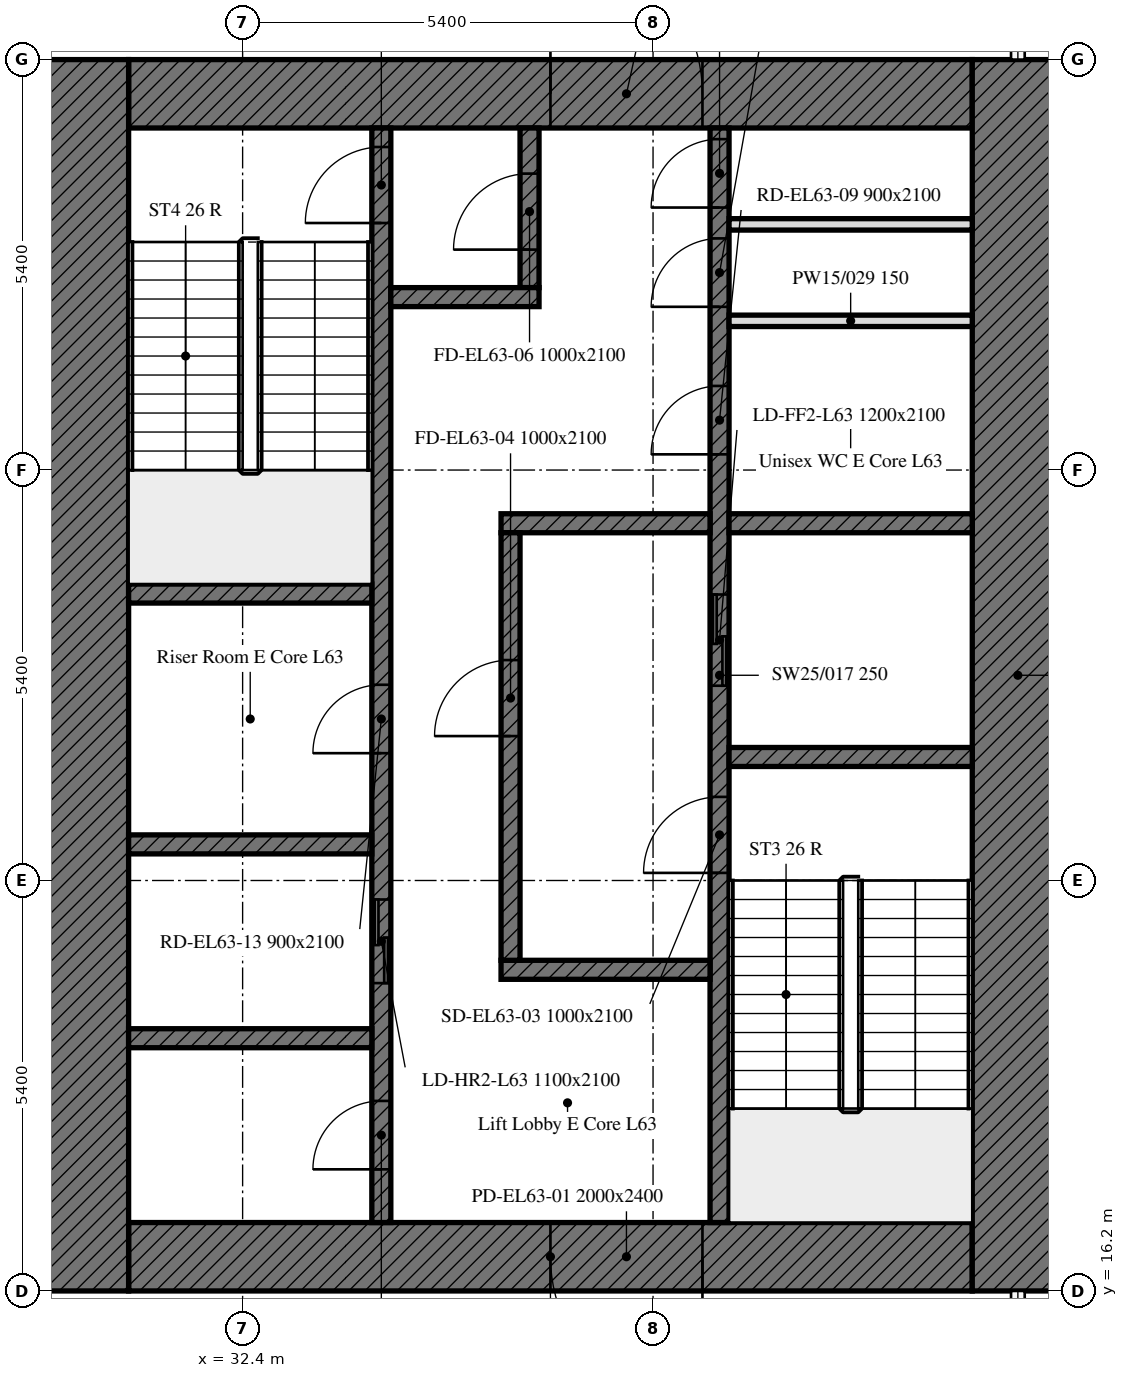
"""IFC4 building model, lengths in metres.
Left out: names, types, materials, properties, quantities, classifications, styles, units other than length and angle.
Written with IfcOpenShell. Run it as: python <this file> out.ifc"""

import sys

from ifc_helpers import new_model, si_unit, direction, frame, frame_2d, origin, place, context, subcontext, project, spatial, rectangle, extrude, element, fill, save


model = new_model("IFC4")
c1 = context("Model", 3, precision=1e-05, world=origin(), true_north=direction((0.0, 1.0)))
c2 = subcontext(c1, "Body", "Model", "MODEL_VIEW")
j1 = project(units=[si_unit("LENGTHUNIT", "METRE"), si_unit("PLANEANGLEUNIT", "RADIAN")], contexts=[c1])
p1 = place(None, origin())
s1 = spatial("IfcSite", under=j1, at=p1, CompositionType="ELEMENT")
p2 = place(p1, origin())
s2 = spatial("IfcBuilding", under=s1, at=p2, CompositionType="ELEMENT")
p3 = place(p2, frame((0.0, 0.0, 260.5)))
s3 = spatial("IfcBuildingStorey", under=s2, at=p3, CompositionType="ELEMENT", Elevation=260.5)
p4 = place(p3, frame((42.0, 16.65, 0.0), z_axis=(0.0, 0.0, 1.0), x_axis=(-1.0, 0.0, 0.0)))
e1 = element("IfcWall", 1, at=p4, inside=s3, PredefinedType="SOLIDWALL", context=c2, shape_type="SweptSolid", body=[
    extrude(rectangle(XDim=11.1, YDim=0.9, at=frame_2d((5.55, 0.0))), origin(), (0.0, 0.0, 1.0), 4.5),
])
p5 = place(p4, frame((3.55, 0.0, 0.0)))
e2 = element("IfcOpeningElement", 2, at=p5, cuts=e1, PredefinedType="OPENING", context=c2, shape_type="SweptSolid", body=[
    extrude(rectangle(XDim=2.0, YDim=2.4, at=frame_2d((1.0, 1.2))), frame((0.0, 0.45, 0.0), z_axis=(0.0, -1.0, 0.0), x_axis=(1.0, 0.0, 0.0)), (0.0, 0.0, 1.0), 0.9),
])
p6 = place(p3, frame((30.9, 31.95, 0.0), z_axis=(0.0, 0.0, 1.0), x_axis=(1.0, 0.0, 0.0)))
e3 = element("IfcWall", 3, at=p6, inside=s3, PredefinedType="SOLIDWALL", context=c2, shape_type="SweptSolid", body=[
    extrude(rectangle(XDim=11.1, YDim=0.9, at=frame_2d((5.55, 0.0))), origin(), (0.0, 0.0, 1.0), 4.5),
])
p7 = place(p6, frame((5.55, 0.0, 0.0)))
e4 = element("IfcOpeningElement", 4, at=p7, cuts=e3, PredefinedType="OPENING", context=c2, shape_type="SweptSolid", body=[
    extrude(rectangle(XDim=2.0, YDim=2.4, at=frame_2d((1.0, 1.2))), frame((0.0, 0.45, 0.0), z_axis=(0.0, -1.0, 0.0), x_axis=(1.0, 0.0, 0.0)), (0.0, 0.0, 1.0), 0.9),
])
for number, where, z_axis, x_axis in (
    (5, (42.6, 32.4, 0.0), (0.0, 0.0, 1.0), (0.0, -1.0, 0.0)),
    (6, (30.3, 16.2, 0.0), (0.0, 0.0, 1.0), (0.0, 1.0, 0.0)),
):
    element("IfcWall", number, at=place(p3, frame(where, z_axis=z_axis, x_axis=x_axis)), inside=s3, PredefinedType="SOLIDWALL", context=c2, shape_type="SweptSolid", body=[
        extrude(rectangle(XDim=16.2, YDim=1.2, at=frame_2d((8.1, 0.0))), origin(), (0.0, 0.0, 1.0), 4.5),
    ])
p8 = place(p3, frame((38.675, 17.1, 0.0), z_axis=(0.0, 0.0, 1.0), x_axis=(0.0, 1.0, 0.0)))
e7 = element("IfcWall", 7, at=p8, inside=s3, PredefinedType="SOLIDWALL", context=c2, shape_type="SweptSolid", body=[
    extrude(rectangle(XDim=14.4, YDim=0.25, at=frame_2d((7.2, 0.0))), origin(), (0.0, 0.0, 1.0), 4.5),
])
p9 = place(p8, frame((4.6, 0.0, 0.0)))
e8 = element("IfcOpeningElement", 8, at=p9, cuts=e7, PredefinedType="OPENING", context=c2, shape_type="SweptSolid", body=[
    extrude(rectangle(XDim=1.0, YDim=2.1, at=frame_2d((0.5, 1.05))), frame((0.0, 0.125, 0.0), z_axis=(0.0, -1.0, 0.0), x_axis=(1.0, 0.0, 0.0)), (0.0, 0.0, 1.0), 0.25),
])
p10 = place(p8, frame((7.062, 0.0, 0.0)))
e9 = element("IfcOpeningElement", 9, at=p10, cuts=e7, PredefinedType="OPENING", context=c2, shape_type="SweptSolid", body=[
    extrude(rectangle(XDim=1.2, YDim=2.1, at=frame_2d((0.6, 1.05))), frame((0.0, 0.125, 0.0), z_axis=(0.0, -1.0, 0.0), x_axis=(1.0, 0.0, 0.0)), (0.0, 0.0, 1.0), 0.25),
])
p11 = place(p8, frame((10.106, 0.0, 0.0)))
e10 = element("IfcOpeningElement", 10, at=p11, cuts=e7, PredefinedType="OPENING", context=c2, shape_type="SweptSolid", body=[
    extrude(rectangle(XDim=0.9, YDim=2.1, at=frame_2d((0.45, 1.05))), frame((0.0, 0.125, 0.0), z_axis=(0.0, -1.0, 0.0), x_axis=(1.0, 0.0, 0.0)), (0.0, 0.0, 1.0), 0.25),
])
p12 = place(p8, frame((12.048, 0.0, 0.0)))
e11 = element("IfcOpeningElement", 11, at=p12, cuts=e7, PredefinedType="OPENING", context=c2, shape_type="SweptSolid", body=[
    extrude(rectangle(XDim=0.9, YDim=2.1, at=frame_2d((0.45, 1.05))), frame((0.0, 0.125, 0.0), z_axis=(0.0, -1.0, 0.0), x_axis=(1.0, 0.0, 0.0)), (0.0, 0.0, 1.0), 0.25),
])
p13 = place(p8, frame((13.354, 0.0, 0.0)))
e12 = element("IfcOpeningElement", 12, at=p13, cuts=e7, PredefinedType="OPENING", context=c2, shape_type="SweptSolid", body=[
    extrude(rectangle(XDim=0.9, YDim=2.1, at=frame_2d((0.45, 1.05))), frame((0.0, 0.125, 0.0), z_axis=(0.0, -1.0, 0.0), x_axis=(1.0, 0.0, 0.0)), (0.0, 0.0, 1.0), 0.25),
])
p14 = place(p3, frame((34.225, 17.1, 0.0), z_axis=(0.0, 0.0, 1.0), x_axis=(0.0, 1.0, 0.0)))
e13 = element("IfcWall", 13, at=p14, inside=s3, PredefinedType="SOLIDWALL", context=c2, shape_type="SweptSolid", body=[
    extrude(rectangle(XDim=14.4, YDim=0.25, at=frame_2d((7.2, 0.0))), origin(), (0.0, 0.0, 1.0), 4.5),
])
p15 = place(p14, frame((13.15, 0.0, 0.0)))
e14 = element("IfcOpeningElement", 14, at=p15, cuts=e13, PredefinedType="OPENING", context=c2, shape_type="SweptSolid", body=[
    extrude(rectangle(XDim=1.0, YDim=2.1, at=frame_2d((0.5, 1.05))), frame((0.0, 0.125, 0.0), z_axis=(0.0, -1.0, 0.0), x_axis=(1.0, 0.0, 0.0)), (0.0, 0.0, 1.0), 0.25),
])
p16 = place(p14, frame((3.15, 0.0, 0.0)))
e15 = element("IfcOpeningElement", 15, at=p16, cuts=e13, PredefinedType="OPENING", context=c2, shape_type="SweptSolid", body=[
    extrude(rectangle(XDim=1.1, YDim=2.1, at=frame_2d((0.55, 1.05))), frame((0.0, 0.125, 0.0), z_axis=(0.0, -1.0, 0.0), x_axis=(1.0, 0.0, 0.0)), (0.0, 0.0, 1.0), 0.25),
])
p17 = place(p14, frame((0.7, 0.0, 0.0)))
e16 = element("IfcOpeningElement", 16, at=p17, cuts=e13, PredefinedType="OPENING", context=c2, shape_type="SweptSolid", body=[
    extrude(rectangle(XDim=0.9, YDim=2.1, at=frame_2d((0.45, 1.05))), frame((0.0, 0.125, 0.0), z_axis=(0.0, -1.0, 0.0), x_axis=(1.0, 0.0, 0.0)), (0.0, 0.0, 1.0), 0.25),
])
p18 = place(p14, frame((6.175, 0.0, 0.0)))
e17 = element("IfcOpeningElement", 17, at=p18, cuts=e13, PredefinedType="OPENING", context=c2, shape_type="SweptSolid", body=[
    extrude(rectangle(XDim=0.9, YDim=2.1, at=frame_2d((0.45, 1.05))), frame((0.0, 0.125, 0.0), z_axis=(0.0, -1.0, 0.0), x_axis=(1.0, 0.0, 0.0)), (0.0, 0.0, 1.0), 0.25),
])
p19 = place(p3, frame((38.8, 23.225, 0.0), z_axis=(0.0, 0.0, 1.0), x_axis=(1.0, 0.0, 0.0)))
e18 = element("IfcWall", 18, at=p19, inside=s3, PredefinedType="SOLIDWALL", context=c2, shape_type="SweptSolid", body=[
    extrude(rectangle(XDim=3.2, YDim=0.25, at=frame_2d((1.6, 0.0))), origin(), (0.0, 0.0, 1.0), 4.5),
])
for number, where, z_axis, x_axis in (
    (19, (30.9, 25.375, 0.0), (0.0, 0.0, 1.0), (1.0, 0.0, 0.0)),
    (20, (30.9, 22.075, 0.0), (0.0, 0.0, 1.0), (1.0, 0.0, 0.0)),
):
    element("IfcWall", number, at=place(p3, frame(where, z_axis=z_axis, x_axis=x_axis)), inside=s3, PredefinedType="SOLIDWALL", context=c2, shape_type="SweptSolid", body=[
        extrude(rectangle(XDim=3.2, YDim=0.25, at=frame_2d((1.6, 0.0))), origin(), (0.0, 0.0, 1.0), 4.5),
    ])
p20 = place(p3, frame((38.8, 26.3, 0.0), z_axis=(0.0, 0.0, 1.0), x_axis=(1.0, 0.0, 0.0)))
e21 = element("IfcWall", 21, at=p20, inside=s3, PredefinedType="SOLIDWALL", context=c2, shape_type="SweptSolid", body=[
    extrude(rectangle(XDim=3.2, YDim=0.25, at=frame_2d((1.6, 0.0))), origin(), (0.0, 0.0, 1.0), 4.5),
])
for number, where, z_axis, x_axis in (
    (22, (35.8, 26.3, 0.0), (0.0, 0.0, 1.0), (1.0, 0.0, 0.0)),
    (23, (35.8, 20.425, 0.0), (0.0, 0.0, 1.0), (1.0, 0.0, 0.0)),
):
    element("IfcWall", number, at=place(p3, frame(where, z_axis=z_axis, x_axis=x_axis)), inside=s3, PredefinedType="SOLIDWALL", context=c2, shape_type="SweptSolid", body=[
        extrude(rectangle(XDim=2.75, YDim=0.25, at=frame_2d((1.375, 0.0))), origin(), (0.0, 0.0, 1.0), 4.5),
    ])
p21 = place(p3, frame((36.175, 29.4, 0.0), z_axis=(0.0, 0.0, 1.0), x_axis=(0.0, 1.0, 0.0)))
e24 = element("IfcWall", 24, at=p21, inside=s3, PredefinedType="SOLIDWALL", context=c2, shape_type="SweptSolid", body=[
    extrude(rectangle(XDim=2.1, YDim=0.25, at=frame_2d((1.05, 0.0))), origin(), (0.0, 0.0, 1.0), 4.5),
])
p22 = place(p21, frame((0.5, 0.0, 0.0)))
e25 = element("IfcOpeningElement", 25, at=p22, cuts=e24, PredefinedType="OPENING", context=c2, shape_type="SweptSolid", body=[
    extrude(rectangle(XDim=1.0, YDim=2.1, at=frame_2d((0.5, 1.05))), frame((0.0, 0.125, 0.0), z_axis=(0.0, -1.0, 0.0), x_axis=(1.0, 0.0, 0.0)), (0.0, 0.0, 1.0), 0.25),
])
p23 = place(p3, frame((34.35, 29.275, 0.0), z_axis=(0.0, 0.0, 1.0), x_axis=(1.0, 0.0, 0.0)))
e26 = element("IfcWall", 26, at=p23, inside=s3, PredefinedType="SOLIDWALL", context=c2, shape_type="SweptSolid", body=[
    extrude(rectangle(XDim=1.95, YDim=0.25, at=frame_2d((0.975, 0.0))), origin(), (0.0, 0.0, 1.0), 4.5),
])
p24 = place(p3, frame((35.925, 20.55, 0.0), z_axis=(0.0, 0.0, 1.0), x_axis=(0.0, 1.0, 0.0)))
e27 = element("IfcWall", 27, at=p24, inside=s3, PredefinedType="SOLIDWALL", context=c2, shape_type="SweptSolid", body=[
    extrude(rectangle(XDim=5.625, YDim=0.25, at=frame_2d((2.812, 0.0))), origin(), (0.0, 0.0, 1.0), 4.5),
])
p25 = place(p24, frame((2.95, 0.0, 0.0)))
e28 = element("IfcOpeningElement", 28, at=p25, cuts=e27, PredefinedType="OPENING", context=c2, shape_type="SweptSolid", body=[
    extrude(rectangle(XDim=1.0, YDim=2.1, at=frame_2d((0.5, 1.05))), frame((0.0, 0.125, 0.0), z_axis=(0.0, -1.0, 0.0), x_axis=(1.0, 0.0, 0.0)), (0.0, 0.0, 1.0), 0.25),
])
p26 = place(p3, frame((30.9, 19.525, 0.0), z_axis=(0.0, 0.0, 1.0), x_axis=(1.0, 0.0, 0.0)))
e29 = element("IfcWall", 29, at=p26, inside=s3, PredefinedType="SOLIDWALL", context=c2, shape_type="SweptSolid", body=[
    extrude(rectangle(XDim=3.2, YDim=0.25, at=frame_2d((1.6, 0.0))), origin(), (0.0, 0.0, 1.0), 4.5),
])
for number, where, z_axis, x_axis in (
    (30, (38.8, 28.963, 0.0), (0.0, 0.0, 1.0), (1.0, 0.0, 0.0)),
    (31, (38.8, 30.232, 0.0), (0.0, 0.0, 1.0), (1.0, 0.0, 0.0)),
):
    element("IfcWall", number, at=place(p3, frame(where, z_axis=z_axis, x_axis=x_axis)), inside=s3, PredefinedType="PARTITIONING", context=c2, shape_type="SweptSolid", body=[
        extrude(rectangle(XDim=3.2, YDim=0.15, at=frame_2d((1.6, 0.0))), origin(), (0.0, 0.0, 1.0), 4.5),
    ])
p27 = place(p5, origin())
e32 = element("IfcDoor", 32, at=p27, inside=s3, OperationType="DOUBLE_DOOR_SINGLE_SWING", PredefinedType="DOOR", context=c2, shape_type="SweptSolid", body=[
    extrude(rectangle(XDim=2.0, YDim=2.4, at=frame_2d((1.0, 1.2))), frame((0.0, 0.025, 0.0), z_axis=(0.0, -1.0, 0.0), x_axis=(1.0, 0.0, 0.0)), (0.0, 0.0, 1.0), 0.05),
])
fill(e2, e32)
p28 = place(p7, origin())
e33 = element("IfcDoor", 33, at=p28, inside=s3, OperationType="DOUBLE_DOOR_SINGLE_SWING", PredefinedType="DOOR", context=c2, shape_type="SweptSolid", body=[
    extrude(rectangle(XDim=2.0, YDim=2.4, at=frame_2d((1.0, 1.2))), frame((0.0, 0.025, 0.0), z_axis=(0.0, -1.0, 0.0), x_axis=(1.0, 0.0, 0.0)), (0.0, 0.0, 1.0), 0.05),
])
fill(e4, e33)
p29 = place(p9, origin())
e34 = element("IfcDoor", 34, at=p29, inside=s3, OperationType="SINGLE_SWING_LEFT", PredefinedType="DOOR", context=c2, shape_type="SweptSolid", body=[
    extrude(rectangle(XDim=1.0, YDim=2.1, at=frame_2d((0.5, 1.05))), frame((0.0, 0.025, 0.0), z_axis=(0.0, -1.0, 0.0), x_axis=(1.0, 0.0, 0.0)), (0.0, 0.0, 1.0), 0.05),
])
fill(e8, e34)
p30 = place(p25, origin())
e35 = element("IfcDoor", 35, at=p30, inside=s3, OperationType="SINGLE_SWING_LEFT", PredefinedType="DOOR", context=c2, shape_type="SweptSolid", body=[
    extrude(rectangle(XDim=1.0, YDim=2.1, at=frame_2d((0.5, 1.05))), frame((0.0, 0.025, 0.0), z_axis=(0.0, -1.0, 0.0), x_axis=(1.0, 0.0, 0.0)), (0.0, 0.0, 1.0), 0.05),
])
fill(e28, e35)
p31 = place(p15, origin())
e36 = element("IfcDoor", 36, at=p31, inside=s3, OperationType="SINGLE_SWING_LEFT", PredefinedType="DOOR", context=c2, shape_type="SweptSolid", body=[
    extrude(rectangle(XDim=1.0, YDim=2.1, at=frame_2d((0.5, 1.05))), frame((0.0, 0.025, 0.0), z_axis=(0.0, -1.0, 0.0), x_axis=(1.0, 0.0, 0.0)), (0.0, 0.0, 1.0), 0.05),
])
fill(e14, e36)
p32 = place(p22, origin())
e37 = element("IfcDoor", 37, at=p32, inside=s3, OperationType="SINGLE_SWING_LEFT", PredefinedType="DOOR", context=c2, shape_type="SweptSolid", body=[
    extrude(rectangle(XDim=1.0, YDim=2.1, at=frame_2d((0.5, 1.05))), frame((0.0, 0.025, 0.0), z_axis=(0.0, -1.0, 0.0), x_axis=(1.0, 0.0, 0.0)), (0.0, 0.0, 1.0), 0.05),
])
fill(e25, e37)
p33 = place(p10, origin())
e38 = element("IfcDoor", 38, at=p33, inside=s3, OperationType="DOUBLE_DOOR_SLIDING", PredefinedType="DOOR", context=c2, shape_type="SweptSolid", body=[
    extrude(rectangle(XDim=1.2, YDim=2.1, at=frame_2d((0.6, 1.05))), frame((0.0, 0.025, 0.0), z_axis=(0.0, -1.0, 0.0), x_axis=(1.0, 0.0, 0.0)), (0.0, 0.0, 1.0), 0.05),
])
fill(e9, e38)
p34 = place(p16, origin())
e39 = element("IfcDoor", 39, at=p34, inside=s3, OperationType="DOUBLE_DOOR_SLIDING", PredefinedType="DOOR", context=c2, shape_type="SweptSolid", body=[
    extrude(rectangle(XDim=1.1, YDim=2.1, at=frame_2d((0.55, 1.05))), frame((0.0, 0.025, 0.0), z_axis=(0.0, -1.0, 0.0), x_axis=(1.0, 0.0, 0.0)), (0.0, 0.0, 1.0), 0.05),
])
fill(e15, e39)
p35 = place(p11, origin())
e40 = element("IfcDoor", 40, at=p35, inside=s3, OperationType="SINGLE_SWING_LEFT", PredefinedType="DOOR", context=c2, shape_type="SweptSolid", body=[
    extrude(rectangle(XDim=0.9, YDim=2.1, at=frame_2d((0.45, 1.05))), frame((0.0, 0.025, 0.0), z_axis=(0.0, -1.0, 0.0), x_axis=(1.0, 0.0, 0.0)), (0.0, 0.0, 1.0), 0.05),
])
fill(e10, e40)
p36 = place(p12, origin())
e41 = element("IfcDoor", 41, at=p36, inside=s3, OperationType="SINGLE_SWING_LEFT", PredefinedType="DOOR", context=c2, shape_type="SweptSolid", body=[
    extrude(rectangle(XDim=0.9, YDim=2.1, at=frame_2d((0.45, 1.05))), frame((0.0, 0.025, 0.0), z_axis=(0.0, -1.0, 0.0), x_axis=(1.0, 0.0, 0.0)), (0.0, 0.0, 1.0), 0.05),
])
fill(e11, e41)
p37 = place(p13, origin())
e42 = element("IfcDoor", 42, at=p37, inside=s3, OperationType="SINGLE_SWING_LEFT", PredefinedType="DOOR", context=c2, shape_type="SweptSolid", body=[
    extrude(rectangle(XDim=0.9, YDim=2.1, at=frame_2d((0.45, 1.05))), frame((0.0, 0.025, 0.0), z_axis=(0.0, -1.0, 0.0), x_axis=(1.0, 0.0, 0.0)), (0.0, 0.0, 1.0), 0.05),
])
fill(e12, e42)
p38 = place(p17, origin())
e43 = element("IfcDoor", 43, at=p38, inside=s3, OperationType="SINGLE_SWING_LEFT", PredefinedType="DOOR", context=c2, shape_type="SweptSolid", body=[
    extrude(rectangle(XDim=0.9, YDim=2.1, at=frame_2d((0.45, 1.05))), frame((0.0, 0.025, 0.0), z_axis=(0.0, -1.0, 0.0), x_axis=(1.0, 0.0, 0.0)), (0.0, 0.0, 1.0), 0.05),
])
fill(e16, e43)
p39 = place(p18, origin())
e44 = element("IfcDoor", 44, at=p39, inside=s3, OperationType="SINGLE_SWING_LEFT", PredefinedType="DOOR", context=c2, shape_type="SweptSolid", body=[
    extrude(rectangle(XDim=0.9, YDim=2.1, at=frame_2d((0.45, 1.05))), frame((0.0, 0.025, 0.0), z_axis=(0.0, -1.0, 0.0), x_axis=(1.0, 0.0, 0.0)), (0.0, 0.0, 1.0), 0.05),
])
fill(e17, e44)
save(model, sys.argv[1])
